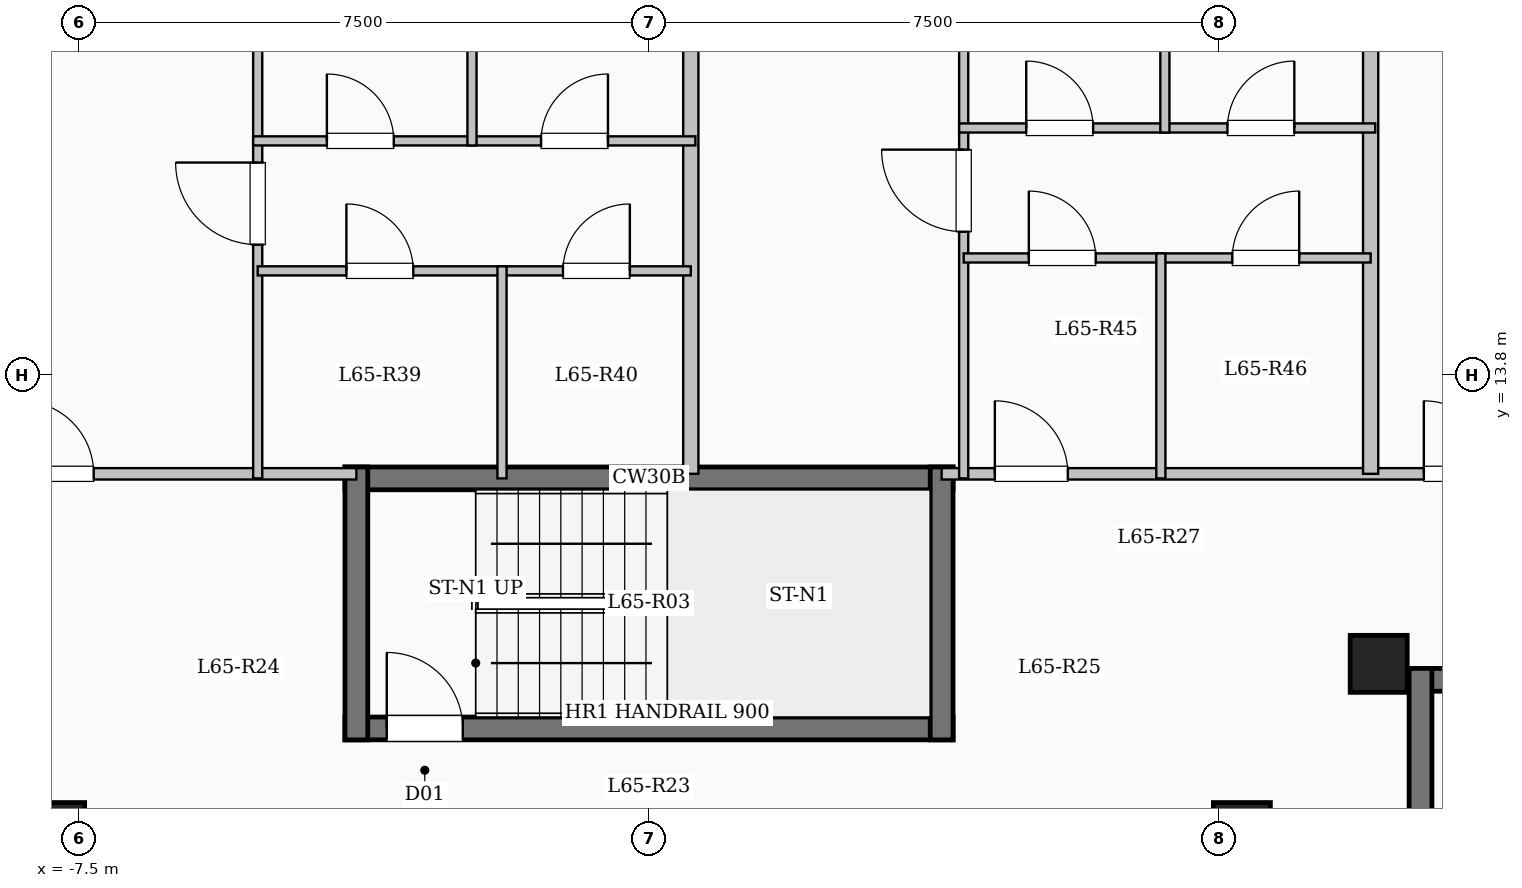
"""IFC4 building model, lengths in metres.
Left out: names, types, materials, properties, quantities, classifications, styles, units other than length and angle.
Written with IfcOpenShell. Run it as: python <this file> out.ifc"""

import sys

from ifc_helpers import new_model, si_unit, direction, frame, frame_2d, origin, origin_2d, place, context, subcontext, project, spatial, rectangle, extrude, element, fill, save


model = new_model("IFC4")
c1 = context("Model", 3, precision=1e-05, world=origin(), true_north=direction((0.0, 1.0)))
c2 = subcontext(c1, "Body", "Model", "MODEL_VIEW")
j1 = project(units=[si_unit("LENGTHUNIT", "METRE"), si_unit("PLANEANGLEUNIT", "RADIAN")], contexts=[c1])
p1 = place(None, origin())
s1 = spatial("IfcSite", under=j1, at=p1, CompositionType="ELEMENT")
p2 = place(p1, origin())
s2 = spatial("IfcBuilding", under=s1, at=p2, CompositionType="ELEMENT")
p3 = place(p2, frame((0.0, 0.0, 241.5)))
s3 = spatial("IfcBuildingStorey", under=s2, at=p3, CompositionType="ELEMENT", Elevation=241.5)
for number, where, z_axis, x_axis in (
    (1, (-7.8, 7.8, 0.0), (0.0, 0.0, 1.0), (1.0, 0.0, 0.0)),
    (2, (7.8, 7.8, 0.0), (0.0, 0.0, 1.0), (1.0, 0.0, 0.0)),
    (3, (9.6, 10.0, 0.0), (0.0, 0.0, 1.0), (1.0, 0.0, 0.0)),
):
    element("IfcColumn", number, at=place(p3, frame(where, z_axis=z_axis, x_axis=x_axis)), inside=s3, PredefinedType="COLUMN", context=c2, shape_type="SweptSolid", body=[
        extrude(rectangle(XDim=0.75, YDim=0.75, at=origin_2d()), origin(), (0.0, 0.0, 1.0), 3.35),
    ])
p4 = place(p3, frame((10.0, 9.79, 0.0), z_axis=(0.0, 0.0, 1.0), x_axis=(1.0, 0.0, 0.0)))
e4 = element("IfcWall", 4, at=p4, inside=s3, PredefinedType="SHEAR", context=c2, shape_type="SweptSolid", body=[
    extrude(rectangle(XDim=8.0, YDim=0.3, at=frame_2d((4.0, 0.0))), origin(), (0.0, 0.0, 1.0), 3.35),
])
p5 = place(p3, frame((10.15, 6.35, 0.0), z_axis=(0.0, 0.0, 1.0), x_axis=(0.0, 1.0, 0.0)))
e5 = element("IfcWall", 5, at=p5, inside=s3, PredefinedType="SHEAR", context=c2, shape_type="SweptSolid", body=[
    extrude(rectangle(XDim=3.59, YDim=0.3, at=frame_2d((1.795, 0.0))), origin(), (0.0, 0.0, 1.0), 3.35),
])
p6 = place(p3, frame((-4.0, 12.44, 0.0), z_axis=(0.0, 0.0, 1.0), x_axis=(1.0, 0.0, 0.0)))
e6 = element("IfcWall", 6, at=p6, inside=s3, PredefinedType="SHEAR", context=c2, shape_type="SweptSolid", body=[
    extrude(rectangle(XDim=8.0, YDim=0.3, at=frame_2d((4.0, 0.0))), origin(), (0.0, 0.0, 1.0), 3.35),
])
p7 = place(p3, frame((-4.0, 9.15, 0.0), z_axis=(0.0, 0.0, 1.0), x_axis=(1.0, 0.0, 0.0)))
e7 = element("IfcWall", 7, at=p7, inside=s3, PredefinedType="SHEAR", context=c2, shape_type="SweptSolid", body=[
    extrude(rectangle(XDim=8.0, YDim=0.3, at=frame_2d((4.0, 0.0))), origin(), (0.0, 0.0, 1.0), 3.35),
])
p8 = place(p7, frame((0.55, 0.0, 0.0)))
e8 = element("IfcOpeningElement", 8, at=p8, cuts=e7, PredefinedType="OPENING", context=c2, shape_type="SweptSolid", body=[
    extrude(rectangle(XDim=1.0, YDim=2.15, at=frame_2d((0.5, 1.075))), frame((0.0, 0.16, 0.0), z_axis=(0.0, -1.0, 0.0), x_axis=(1.0, 0.0, 0.0)), (0.0, 0.0, 1.0), 0.32),
])
for number, where, z_axis, x_axis in (
    (9, (-3.85, 9.0, 0.0), (0.0, 0.0, 1.0), (0.0, 1.0, 0.0)),
    (10, (3.85, 9.0, 0.0), (0.0, 0.0, 1.0), (0.0, 1.0, 0.0)),
):
    element("IfcWall", number, at=place(p3, frame(where, z_axis=z_axis, x_axis=x_axis)), inside=s3, PredefinedType="SHEAR", context=c2, shape_type="SweptSolid", body=[
        extrude(rectangle(XDim=3.59, YDim=0.3, at=frame_2d((1.795, 0.0))), origin(), (0.0, 0.0, 1.0), 3.35),
    ])
p9 = place(p3, frame((-17.75, 12.5, 0.0), z_axis=(0.0, 0.0, 1.0), x_axis=(1.0, 0.0, 0.0)))
e11 = element("IfcWall", 11, at=p9, inside=s3, PredefinedType="PARTITIONING", context=c2, shape_type="SweptSolid", body=[
    extrude(rectangle(XDim=13.9, YDim=0.15, at=frame_2d((6.95, 0.0))), origin(), (0.0, 0.0, 1.0), 3.1),
])
p10 = place(p9, frame((0.7, 0.0, 0.0)))
e12 = element("IfcOpeningElement", 12, at=p10, cuts=e11, PredefinedType="OPENING", context=c2, shape_type="SweptSolid", body=[
    extrude(rectangle(XDim=0.96, YDim=2.15, at=frame_2d((0.48, 1.075))), frame((0.0, 0.085, 0.0), z_axis=(0.0, -1.0, 0.0), x_axis=(1.0, 0.0, 0.0)), (0.0, 0.0, 1.0), 0.17),
])
p11 = place(p9, frame((9.484, 0.0, 0.0)))
e13 = element("IfcOpeningElement", 13, at=p11, cuts=e11, PredefinedType="OPENING", context=c2, shape_type="SweptSolid", body=[
    extrude(rectangle(XDim=0.96, YDim=2.15, at=frame_2d((0.48, 1.075))), frame((0.0, 0.085, 0.0), z_axis=(0.0, -1.0, 0.0), x_axis=(1.0, 0.0, 0.0)), (0.0, 0.0, 1.0), 0.17),
])
p12 = place(p3, frame((3.85, 12.5, 0.0), z_axis=(0.0, 0.0, 1.0), x_axis=(1.0, 0.0, 0.0)))
e14 = element("IfcWall", 14, at=p12, inside=s3, PredefinedType="PARTITIONING", context=c2, shape_type="SweptSolid", body=[
    extrude(rectangle(XDim=13.9, YDim=0.15, at=frame_2d((6.95, 0.0))), origin(), (0.0, 0.0, 1.0), 3.1),
])
p13 = place(p12, frame((0.7, 0.0, 0.0)))
e15 = element("IfcOpeningElement", 15, at=p13, cuts=e14, PredefinedType="OPENING", context=c2, shape_type="SweptSolid", body=[
    extrude(rectangle(XDim=0.96, YDim=2.15, at=frame_2d((0.48, 1.075))), frame((0.0, 0.085, 0.0), z_axis=(0.0, -1.0, 0.0), x_axis=(1.0, 0.0, 0.0)), (0.0, 0.0, 1.0), 0.17),
])
p14 = place(p12, frame((6.344, 0.0, 0.0)))
e16 = element("IfcOpeningElement", 16, at=p14, cuts=e14, PredefinedType="OPENING", context=c2, shape_type="SweptSolid", body=[
    extrude(rectangle(XDim=0.96, YDim=2.15, at=frame_2d((0.48, 1.075))), frame((0.0, 0.085, 0.0), z_axis=(0.0, -1.0, 0.0), x_axis=(1.0, 0.0, 0.0)), (0.0, 0.0, 1.0), 0.17),
])
p15 = place(p3, frame((0.55, 12.5, 0.0), z_axis=(0.0, 0.0, 1.0), x_axis=(0.0, 1.0, 0.0)))
e17 = element("IfcWall", 17, at=p15, inside=s3, PredefinedType="SOLIDWALL", context=c2, shape_type="SweptSolid", body=[
    extrude(rectangle(XDim=9.88, YDim=0.2, at=frame_2d((4.94, 0.0))), origin(), (0.0, 0.0, 1.0), 3.1),
])
p16 = place(p3, frame((-5.148, 12.44, 0.0), z_axis=(0.0, 0.0, 1.0), x_axis=(0.0, 1.0, 0.0)))
e18 = element("IfcWall", 18, at=p16, inside=s3, PredefinedType="PARTITIONING", context=c2, shape_type="SweptSolid", body=[
    extrude(rectangle(XDim=9.903, YDim=0.12, at=frame_2d((4.952, 0.0))), origin(), (0.0, 0.0, 1.0), 3.1),
])
p17 = place(p16, frame((3.075, 0.0, 0.0)))
e19 = element("IfcOpeningElement", 19, at=p17, cuts=e18, PredefinedType="OPENING", context=c2, shape_type="SweptSolid", body=[
    extrude(rectangle(XDim=1.08, YDim=2.15, at=frame_2d((0.54, 1.075))), frame((0.0, 0.07, 0.0), z_axis=(0.0, -1.0, 0.0), x_axis=(1.0, 0.0, 0.0)), (0.0, 0.0, 1.0), 0.14),
])
p18 = place(p3, frame((-5.148, 15.17, 0.0), z_axis=(0.0, 0.0, 1.0), x_axis=(1.0, 0.0, 0.0)))
e20 = element("IfcWall", 20, at=p18, inside=s3, PredefinedType="PARTITIONING", context=c2, shape_type="SweptSolid", body=[
    extrude(rectangle(XDim=3.214, YDim=0.12, at=frame_2d((1.607, 0.0))), origin(), (0.0, 0.0, 1.0), 3.1),
])
p19 = place(p18, frame((1.167, 0.0, 0.0)))
e21 = element("IfcOpeningElement", 21, at=p19, cuts=e20, PredefinedType="OPENING", context=c2, shape_type="SweptSolid", body=[
    extrude(rectangle(XDim=0.88, YDim=2.1, at=frame_2d((0.44, 1.05))), frame((0.0, 0.07, 0.0), z_axis=(0.0, -1.0, 0.0), x_axis=(1.0, 0.0, 0.0)), (0.0, 0.0, 1.0), 0.14),
])
p20 = place(p3, frame((-1.934, 15.17, 0.0), z_axis=(0.0, 0.0, 1.0), x_axis=(1.0, 0.0, 0.0)))
e22 = element("IfcWall", 22, at=p20, inside=s3, PredefinedType="PARTITIONING", context=c2, shape_type="SweptSolid", body=[
    extrude(rectangle(XDim=2.484, YDim=0.12, at=frame_2d((1.242, 0.0))), origin(), (0.0, 0.0, 1.0), 3.1),
])
p21 = place(p20, frame((0.802, 0.0, 0.0)))
e23 = element("IfcOpeningElement", 23, at=p21, cuts=e22, PredefinedType="OPENING", context=c2, shape_type="SweptSolid", body=[
    extrude(rectangle(XDim=0.88, YDim=2.1, at=frame_2d((0.44, 1.05))), frame((0.0, 0.07, 0.0), z_axis=(0.0, -1.0, 0.0), x_axis=(1.0, 0.0, 0.0)), (0.0, 0.0, 1.0), 0.14),
])
p22 = place(p3, frame((-5.208, 16.88, 0.0), z_axis=(0.0, 0.0, 1.0), x_axis=(1.0, 0.0, 0.0)))
e24 = element("IfcWall", 24, at=p22, inside=s3, PredefinedType="PARTITIONING", context=c2, shape_type="SweptSolid", body=[
    extrude(rectangle(XDim=5.818, YDim=0.12, at=frame_2d((2.909, 0.0))), origin(), (0.0, 0.0, 1.0), 2.785),
])
p23 = place(p22, frame((0.97, 0.0, 0.0)))
e25 = element("IfcOpeningElement", 25, at=p23, cuts=e24, PredefinedType="OPENING", context=c2, shape_type="SweptSolid", body=[
    extrude(rectangle(XDim=0.88, YDim=2.1, at=frame_2d((0.44, 1.05))), frame((0.0, 0.07, 0.0), z_axis=(0.0, -1.0, 0.0), x_axis=(1.0, 0.0, 0.0)), (0.0, 0.0, 1.0), 0.14),
])
p24 = place(p22, frame((3.788, 0.0, 0.0)))
e26 = element("IfcOpeningElement", 26, at=p24, cuts=e24, PredefinedType="OPENING", context=c2, shape_type="SweptSolid", body=[
    extrude(rectangle(XDim=0.88, YDim=2.1, at=frame_2d((0.44, 1.05))), frame((0.0, 0.07, 0.0), z_axis=(0.0, -1.0, 0.0), x_axis=(1.0, 0.0, 0.0)), (0.0, 0.0, 1.0), 0.14),
])
p25 = place(p3, frame((-1.934, 12.44, 0.0), z_axis=(0.0, 0.0, 1.0), x_axis=(0.0, 1.0, 0.0)))
e27 = element("IfcWall", 27, at=p25, inside=s3, PredefinedType="PARTITIONING", context=c2, shape_type="SweptSolid", body=[
    extrude(rectangle(XDim=2.79, YDim=0.12, at=frame_2d((1.395, 0.0))), origin(), (0.0, 0.0, 1.0), 3.1),
])
p26 = place(p3, frame((-2.329, 16.82, 0.0), z_axis=(0.0, 0.0, 1.0), x_axis=(0.0, 1.0, 0.0)))
e28 = element("IfcWall", 28, at=p26, inside=s3, PredefinedType="PARTITIONING", context=c2, shape_type="SweptSolid", body=[
    extrude(rectangle(XDim=5.56, YDim=0.12, at=frame_2d((2.78, 0.0))), origin(), (0.0, 0.0, 1.0), 3.1),
])
p27 = place(p3, frame((9.494, 12.5, 0.0), z_axis=(0.0, 0.0, 1.0), x_axis=(0.0, 1.0, 0.0)))
e29 = element("IfcWall", 29, at=p27, inside=s3, PredefinedType="SOLIDWALL", context=c2, shape_type="SweptSolid", body=[
    extrude(rectangle(XDim=8.771, YDim=0.2, at=frame_2d((4.385, 0.0))), origin(), (0.0, 0.0, 1.0), 3.1),
])
p28 = place(p3, frame((4.14, 12.44, 0.0), z_axis=(0.0, 0.0, 1.0), x_axis=(0.0, 1.0, 0.0)))
e30 = element("IfcWall", 30, at=p28, inside=s3, PredefinedType="PARTITIONING", context=c2, shape_type="SweptSolid", body=[
    extrude(rectangle(XDim=9.94, YDim=0.12, at=frame_2d((4.97, 0.0))), origin(), (0.0, 0.0, 1.0), 3.1),
])
p29 = place(p28, frame((3.245, 0.0, 0.0)))
e31 = element("IfcOpeningElement", 31, at=p29, cuts=e30, PredefinedType="OPENING", context=c2, shape_type="SweptSolid", body=[
    extrude(rectangle(XDim=1.08, YDim=2.15, at=frame_2d((0.54, 1.075))), frame((0.0, 0.07, 0.0), z_axis=(0.0, -1.0, 0.0), x_axis=(1.0, 0.0, 0.0)), (0.0, 0.0, 1.0), 0.14),
])
p30 = place(p3, frame((4.14, 15.34, 0.0), z_axis=(0.0, 0.0, 1.0), x_axis=(1.0, 0.0, 0.0)))
e32 = element("IfcWall", 32, at=p30, inside=s3, PredefinedType="PARTITIONING", context=c2, shape_type="SweptSolid", body=[
    extrude(rectangle(XDim=2.594, YDim=0.12, at=frame_2d((1.297, 0.0))), origin(), (0.0, 0.0, 1.0), 2.785),
])
p31 = place(p30, frame((0.857, 0.0, 0.0)))
e33 = element("IfcOpeningElement", 33, at=p31, cuts=e32, PredefinedType="OPENING", context=c2, shape_type="SweptSolid", body=[
    extrude(rectangle(XDim=0.88, YDim=2.1, at=frame_2d((0.44, 1.05))), frame((0.0, 0.07, 0.0), z_axis=(0.0, -1.0, 0.0), x_axis=(1.0, 0.0, 0.0)), (0.0, 0.0, 1.0), 0.14),
])
p32 = place(p3, frame((6.734, 15.34, 0.0), z_axis=(0.0, 0.0, 1.0), x_axis=(1.0, 0.0, 0.0)))
e34 = element("IfcWall", 34, at=p32, inside=s3, PredefinedType="PARTITIONING", context=c2, shape_type="SweptSolid", body=[
    extrude(rectangle(XDim=2.76, YDim=0.12, at=frame_2d((1.38, 0.0))), origin(), (0.0, 0.0, 1.0), 2.785),
])
p33 = place(p32, frame((0.94, 0.0, 0.0)))
e35 = element("IfcOpeningElement", 35, at=p33, cuts=e34, PredefinedType="OPENING", context=c2, shape_type="SweptSolid", body=[
    extrude(rectangle(XDim=0.88, YDim=2.1, at=frame_2d((0.44, 1.05))), frame((0.0, 0.07, 0.0), z_axis=(0.0, -1.0, 0.0), x_axis=(1.0, 0.0, 0.0)), (0.0, 0.0, 1.0), 0.14),
])
p34 = place(p3, frame((4.08, 17.05, 0.0), z_axis=(0.0, 0.0, 1.0), x_axis=(1.0, 0.0, 0.0)))
e36 = element("IfcWall", 36, at=p34, inside=s3, PredefinedType="PARTITIONING", context=c2, shape_type="SweptSolid", body=[
    extrude(rectangle(XDim=5.474, YDim=0.12, at=frame_2d((2.737, 0.0))), origin(), (0.0, 0.0, 1.0), 2.785),
])
p35 = place(p34, frame((0.883, 0.0, 0.0)))
e37 = element("IfcOpeningElement", 37, at=p35, cuts=e36, PredefinedType="OPENING", context=c2, shape_type="SweptSolid", body=[
    extrude(rectangle(XDim=0.88, YDim=2.1, at=frame_2d((0.44, 1.05))), frame((0.0, 0.07, 0.0), z_axis=(0.0, -1.0, 0.0), x_axis=(1.0, 0.0, 0.0)), (0.0, 0.0, 1.0), 0.14),
])
p36 = place(p34, frame((3.53, 0.0, 0.0)))
e38 = element("IfcOpeningElement", 38, at=p36, cuts=e36, PredefinedType="OPENING", context=c2, shape_type="SweptSolid", body=[
    extrude(rectangle(XDim=0.88, YDim=2.1, at=frame_2d((0.44, 1.05))), frame((0.0, 0.07, 0.0), z_axis=(0.0, -1.0, 0.0), x_axis=(1.0, 0.0, 0.0)), (0.0, 0.0, 1.0), 0.14),
])
p37 = place(p3, frame((6.734, 12.44, 0.0), z_axis=(0.0, 0.0, 1.0), x_axis=(0.0, 1.0, 0.0)))
e39 = element("IfcWall", 39, at=p37, inside=s3, PredefinedType="PARTITIONING", context=c2, shape_type="SweptSolid", body=[
    extrude(rectangle(XDim=2.96, YDim=0.12, at=frame_2d((1.48, 0.0))), origin(), (0.0, 0.0, 1.0), 3.1),
])
p38 = place(p3, frame((6.787, 16.99, 0.0), z_axis=(0.0, 0.0, 1.0), x_axis=(0.0, 1.0, 0.0)))
e40 = element("IfcWall", 40, at=p38, inside=s3, PredefinedType="PARTITIONING", context=c2, shape_type="SweptSolid", body=[
    extrude(rectangle(XDim=4.949, YDim=0.12, at=frame_2d((2.475, 0.0))), origin(), (0.0, 0.0, 1.0), 3.1),
])
p39 = place(p8, origin())
e41 = element("IfcDoor", 41, at=p39, inside=s3, OperationType="SINGLE_SWING_LEFT", PredefinedType="DOOR", context=c2, shape_type="SweptSolid", body=[
    extrude(rectangle(XDim=1.0, YDim=2.15, at=frame_2d((0.5, 1.075))), frame((0.0, 0.025, 0.0), z_axis=(0.0, -1.0, 0.0), x_axis=(1.0, 0.0, 0.0)), (0.0, 0.0, 1.0), 0.05),
])
fill(e8, e41)
p40 = place(p11, origin())
e42 = element("IfcDoor", 42, at=p40, inside=s3, OperationType="SINGLE_SWING_LEFT", PredefinedType="DOOR", context=c2, shape_type="SweptSolid", body=[
    extrude(rectangle(XDim=0.96, YDim=2.15, at=frame_2d((0.48, 1.075))), frame((0.0, 0.025, 0.0), z_axis=(0.0, -1.0, 0.0), x_axis=(1.0, 0.0, 0.0)), (0.0, 0.0, 1.0), 0.05),
])
fill(e13, e42)
p41 = place(p17, origin())
e43 = element("IfcDoor", 43, at=p41, inside=s3, OperationType="SINGLE_SWING_RIGHT", PredefinedType="DOOR", context=c2, shape_type="SweptSolid", body=[
    extrude(rectangle(XDim=1.08, YDim=2.15, at=frame_2d((0.54, 1.075))), frame((0.0, 0.025, 0.0), z_axis=(0.0, -1.0, 0.0), x_axis=(1.0, 0.0, 0.0)), (0.0, 0.0, 1.0), 0.05),
])
fill(e19, e43)
p42 = place(p19, origin())
e44 = element("IfcDoor", 44, at=p42, inside=s3, OperationType="SINGLE_SWING_LEFT", PredefinedType="DOOR", context=c2, shape_type="SweptSolid", body=[
    extrude(rectangle(XDim=0.88, YDim=2.1, at=frame_2d((0.44, 1.05))), frame((0.0, 0.025, 0.0), z_axis=(0.0, -1.0, 0.0), x_axis=(1.0, 0.0, 0.0)), (0.0, 0.0, 1.0), 0.05),
])
fill(e21, e44)
p43 = place(p21, origin())
e45 = element("IfcDoor", 45, at=p43, inside=s3, OperationType="SINGLE_SWING_RIGHT", PredefinedType="DOOR", context=c2, shape_type="SweptSolid", body=[
    extrude(rectangle(XDim=0.88, YDim=2.1, at=frame_2d((0.44, 1.05))), frame((0.0, 0.025, 0.0), z_axis=(0.0, -1.0, 0.0), x_axis=(1.0, 0.0, 0.0)), (0.0, 0.0, 1.0), 0.05),
])
fill(e23, e45)
p44 = place(p23, origin())
e46 = element("IfcDoor", 46, at=p44, inside=s3, OperationType="SINGLE_SWING_LEFT", PredefinedType="DOOR", context=c2, shape_type="SweptSolid", body=[
    extrude(rectangle(XDim=0.88, YDim=2.1, at=frame_2d((0.44, 1.05))), frame((0.0, 0.025, 0.0), z_axis=(0.0, -1.0, 0.0), x_axis=(1.0, 0.0, 0.0)), (0.0, 0.0, 1.0), 0.05),
])
fill(e25, e46)
p45 = place(p24, origin())
e47 = element("IfcDoor", 47, at=p45, inside=s3, OperationType="SINGLE_SWING_RIGHT", PredefinedType="DOOR", context=c2, shape_type="SweptSolid", body=[
    extrude(rectangle(XDim=0.88, YDim=2.1, at=frame_2d((0.44, 1.05))), frame((0.0, 0.025, 0.0), z_axis=(0.0, -1.0, 0.0), x_axis=(1.0, 0.0, 0.0)), (0.0, 0.0, 1.0), 0.05),
])
fill(e26, e47)
p46 = place(p13, origin())
e48 = element("IfcDoor", 48, at=p46, inside=s3, OperationType="SINGLE_SWING_LEFT", PredefinedType="DOOR", context=c2, shape_type="SweptSolid", body=[
    extrude(rectangle(XDim=0.96, YDim=2.15, at=frame_2d((0.48, 1.075))), frame((0.0, 0.025, 0.0), z_axis=(0.0, -1.0, 0.0), x_axis=(1.0, 0.0, 0.0)), (0.0, 0.0, 1.0), 0.05),
])
fill(e15, e48)
p47 = place(p29, origin())
e49 = element("IfcDoor", 49, at=p47, inside=s3, OperationType="SINGLE_SWING_RIGHT", PredefinedType="DOOR", context=c2, shape_type="SweptSolid", body=[
    extrude(rectangle(XDim=1.08, YDim=2.15, at=frame_2d((0.54, 1.075))), frame((0.0, 0.025, 0.0), z_axis=(0.0, -1.0, 0.0), x_axis=(1.0, 0.0, 0.0)), (0.0, 0.0, 1.0), 0.05),
])
fill(e31, e49)
p48 = place(p31, origin())
e50 = element("IfcDoor", 50, at=p48, inside=s3, OperationType="SINGLE_SWING_LEFT", PredefinedType="DOOR", context=c2, shape_type="SweptSolid", body=[
    extrude(rectangle(XDim=0.88, YDim=2.1, at=frame_2d((0.44, 1.05))), frame((0.0, 0.025, 0.0), z_axis=(0.0, -1.0, 0.0), x_axis=(1.0, 0.0, 0.0)), (0.0, 0.0, 1.0), 0.05),
])
fill(e33, e50)
p49 = place(p33, origin())
e51 = element("IfcDoor", 51, at=p49, inside=s3, OperationType="SINGLE_SWING_RIGHT", PredefinedType="DOOR", context=c2, shape_type="SweptSolid", body=[
    extrude(rectangle(XDim=0.88, YDim=2.1, at=frame_2d((0.44, 1.05))), frame((0.0, 0.025, 0.0), z_axis=(0.0, -1.0, 0.0), x_axis=(1.0, 0.0, 0.0)), (0.0, 0.0, 1.0), 0.05),
])
fill(e35, e51)
p50 = place(p35, origin())
e52 = element("IfcDoor", 52, at=p50, inside=s3, OperationType="SINGLE_SWING_LEFT", PredefinedType="DOOR", context=c2, shape_type="SweptSolid", body=[
    extrude(rectangle(XDim=0.88, YDim=2.1, at=frame_2d((0.44, 1.05))), frame((0.0, 0.025, 0.0), z_axis=(0.0, -1.0, 0.0), x_axis=(1.0, 0.0, 0.0)), (0.0, 0.0, 1.0), 0.05),
])
fill(e37, e52)
p51 = place(p36, origin())
e53 = element("IfcDoor", 53, at=p51, inside=s3, OperationType="SINGLE_SWING_RIGHT", PredefinedType="DOOR", context=c2, shape_type="SweptSolid", body=[
    extrude(rectangle(XDim=0.88, YDim=2.1, at=frame_2d((0.44, 1.05))), frame((0.0, 0.025, 0.0), z_axis=(0.0, -1.0, 0.0), x_axis=(1.0, 0.0, 0.0)), (0.0, 0.0, 1.0), 0.05),
])
fill(e38, e53)
p52 = place(p14, origin())
e54 = element("IfcDoor", 54, at=p52, inside=s3, OperationType="SINGLE_SWING_LEFT", PredefinedType="DOOR", context=c2, shape_type="SweptSolid", body=[
    extrude(rectangle(XDim=0.96, YDim=2.15, at=frame_2d((0.48, 1.075))), frame((0.0, 0.025, 0.0), z_axis=(0.0, -1.0, 0.0), x_axis=(1.0, 0.0, 0.0)), (0.0, 0.0, 1.0), 0.05),
])
fill(e16, e54)
save(model, sys.argv[1])
